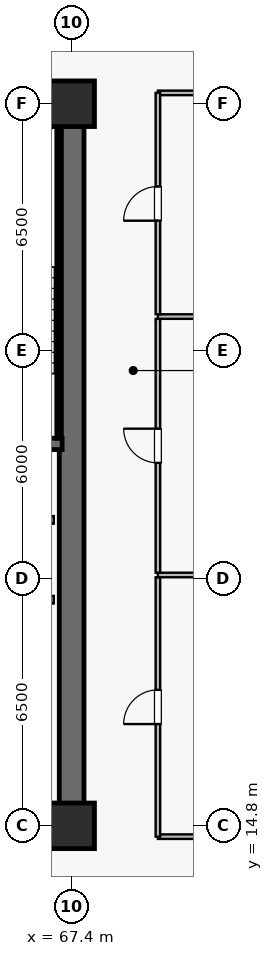
"""IFC4 building model, lengths in metres.
Left out: names, types, materials, properties, quantities, classifications, styles, units other than length and angle.
Written with IfcOpenShell. Run it as: python <this file> out.ifc"""

import sys

from ifc_helpers import new_model, si_unit, direction, frame, frame_2d, origin, origin_2d, place, context, subcontext, project, spatial, rectangle, extrude, source, transform, mapped, element, fill, save


model = new_model("IFC4")
c1 = context("Model", 3, precision=1e-05, world=origin(), true_north=direction((0.0, 1.0)))
c2 = subcontext(c1, "Body", "Model", "MODEL_VIEW")
j1 = project(units=[si_unit("LENGTHUNIT", "METRE"), si_unit("PLANEANGLEUNIT", "RADIAN")], contexts=[c1])
p1 = place(None, origin())
s1 = spatial("IfcSite", under=j1, at=p1, CompositionType="ELEMENT")
p2 = place(p1, origin())
s2 = spatial("IfcBuilding", under=s1, at=p2, CompositionType="ELEMENT")
p3 = place(p2, frame((0.0, 0.0, 150.2)))
s3 = spatial("IfcBuildingStorey", under=s2, at=p3, CompositionType="ELEMENT", Elevation=150.2)
p4 = place(p3, frame((52.275, 14.8, 0.0), z_axis=(0.0, 0.0, 1.0), x_axis=(1.0, 0.0, 0.0)))
e1 = element("IfcWall", 1, at=p4, inside=s3, PredefinedType="SHEAR", context=c2, shape_type="SweptSolid", body=[
    extrude(rectangle(XDim=15.45, YDim=0.65, at=frame_2d((7.725, 0.0))), origin(), (0.0, 0.0, 1.0), 3.79),
])
p5 = place(p3, frame((52.275, 33.8, 0.0), z_axis=(0.0, 0.0, 1.0), x_axis=(1.0, 0.0, 0.0)))
e2 = element("IfcWall", 2, at=p5, inside=s3, PredefinedType="SHEAR", context=c2, shape_type="SweptSolid", body=[
    extrude(rectangle(XDim=15.45, YDim=0.65, at=frame_2d((7.725, 0.0))), origin(), (0.0, 0.0, 1.0), 3.79),
])
p6 = place(p5, frame((8.825, 0.0, 0.0)))
e3 = element("IfcOpeningElement", 3, at=p6, cuts=e2, PredefinedType="OPENING", context=c2, shape_type="SweptSolid", body=[
    extrude(rectangle(XDim=0.95, YDim=2.15, at=frame_2d((0.475, 1.075))), frame((0.0, 0.335, 0.0), z_axis=(0.0, -1.0, 0.0), x_axis=(1.0, 0.0, 0.0)), (0.0, 0.0, 1.0), 0.67),
])
p7 = place(p5, frame((5.46, 0.0, 0.0)))
e4 = element("IfcOpeningElement", 4, at=p7, cuts=e2, PredefinedType="OPENING", context=c2, shape_type="SweptSolid", body=[
    extrude(rectangle(XDim=0.95, YDim=2.15, at=frame_2d((0.475, 1.075))), frame((0.0, 0.335, 0.0), z_axis=(0.0, -1.0, 0.0), x_axis=(1.0, 0.0, 0.0)), (0.0, 0.0, 1.0), 0.67),
])
p8 = place(p5, frame((2.06, 0.0, 0.0)))
e5 = element("IfcOpeningElement", 5, at=p8, cuts=e2, PredefinedType="OPENING", context=c2, shape_type="SweptSolid", body=[
    extrude(rectangle(XDim=0.95, YDim=2.15, at=frame_2d((0.475, 1.075))), frame((0.0, 0.335, 0.0), z_axis=(0.0, -1.0, 0.0), x_axis=(1.0, 0.0, 0.0)), (0.0, 0.0, 1.0), 0.67),
])
p9 = place(p3, frame((67.4, 15.125, 0.0), z_axis=(0.0, 0.0, 1.0), x_axis=(0.0, 1.0, 0.0)))
e6 = element("IfcWall", 6, at=p9, inside=s3, PredefinedType="SHEAR", context=c2, shape_type="SweptSolid", body=[
    extrude(rectangle(XDim=18.35, YDim=0.65, at=frame_2d((9.175, 0.0))), origin(), (0.0, 0.0, 1.0), 3.79),
])
p10 = place(p3, frame((63.35, 24.85, 0.0), z_axis=(0.0, 0.0, 1.0), x_axis=(1.0, 0.0, 0.0)))
e7 = element("IfcWall", 7, at=p10, inside=s3, PredefinedType="SHEAR", context=c2, shape_type="SweptSolid", body=[
    extrude(rectangle(XDim=3.8, YDim=0.3, at=frame_2d((1.9, 0.0))), origin(), (0.0, 0.0, 1.0), 3.79),
])
p11 = place(p3, frame((63.35, 33.4, 0.0), z_axis=(0.0, 0.0, 1.0), x_axis=(1.0, 0.0, 0.0)))
e8 = element("IfcWall", 8, at=p11, inside=s3, PredefinedType="SOLIDWALL", context=c2, shape_type="SweptSolid", body=[
    extrude(rectangle(XDim=3.72, YDim=0.12, at=frame_2d((1.86, 0.0))), origin(), (0.0, 0.0, 1.0), 3.79),
])
p12 = place(p3, frame((67.07, 25.0, 0.0), z_axis=(0.0, 0.0, 1.0), x_axis=(0.0, 1.0, 0.0)))
e9 = element("IfcWall", 9, at=p12, inside=s3, PredefinedType="SOLIDWALL", context=c2, shape_type="SweptSolid", body=[
    extrude(rectangle(XDim=8.32, YDim=0.12, at=frame_2d((4.16, 0.0))), origin(), (0.0, 0.0, 1.0), 3.79),
])
m1 = source(origin(), c2, "Body", "SweptSolid", [
    extrude(rectangle(XDim=1.2, YDim=1.2, at=origin_2d()), origin(), (0.0, 0.0, 1.0), 4.1),
])
for number, where, z_axis, x_axis in (
    (10, (67.4, 14.8, 0.0), (0.0, 0.0, 1.0), (1.0, 0.0, 0.0)),
    (11, (67.4, 33.8, 0.0), (0.0, 0.0, 1.0), (1.0, 0.0, 0.0)),
):
    element("IfcColumn", number, at=place(p3, frame(where, z_axis=z_axis, x_axis=x_axis)), inside=s3, PredefinedType="COLUMN", context=c2, shape_type="MappedRepresentation", body=[
        mapped(m1, transform((0.0, 0.0, 0.0), scale=1.0)),
    ])
for number, where, z_axis, x_axis in (
    (12, (64.67, 20.75, 0.0), (0.0, 0.0, 1.0), (1.0, 0.0, 0.0)),
    (13, (64.67, 22.85, 0.0), (0.0, 0.0, 1.0), (1.0, 0.0, 0.0)),
):
    element("IfcWall", number, at=place(p3, frame(where, z_axis=z_axis, x_axis=x_axis)), inside=s3, PredefinedType="SOLIDWALL", context=c2, shape_type="SweptSolid", body=[
        extrude(rectangle(XDim=2.26, YDim=0.2, at=frame_2d((1.13, 0.0))), origin(), (0.0, 0.0, 1.0), 3.79),
    ])
for number, where, z_axis, x_axis in (
    (14, (69.67, 14.515, 0.0), (0.0, 0.0, 1.0), (1.0, 0.0, 0.0)),
    (15, (69.67, 34.085, 0.0), (0.0, 0.0, 1.0), (1.0, 0.0, 0.0)),
):
    element("IfcWall", number, at=place(p3, frame(where, z_axis=z_axis, x_axis=x_axis)), inside=s3, PredefinedType="PARTITIONING", context=c2, shape_type="SweptSolid", body=[
        extrude(rectangle(XDim=3.02, YDim=0.12, at=frame_2d((1.51, 0.0))), origin(), (0.0, 0.0, 1.0), 3.79),
    ])
p13 = place(p3, frame((69.67, 14.515, 0.0), z_axis=(0.0, 0.0, 1.0), x_axis=(0.0, 1.0, 0.0)))
e16 = element("IfcWall", 16, at=p13, inside=s3, PredefinedType="PARTITIONING", context=c2, shape_type="SweptSolid", body=[
    extrude(rectangle(XDim=6.825, YDim=0.12, at=frame_2d((3.413, 0.0))), origin(), (0.0, 0.0, 1.0), 3.79),
])
p14 = place(p13, frame((2.962, 0.0, 0.0)))
e17 = element("IfcOpeningElement", 17, at=p14, cuts=e16, PredefinedType="OPENING", context=c2, shape_type="SweptSolid", body=[
    extrude(rectangle(XDim=0.9, YDim=2.1, at=frame_2d((0.45, 1.05))), frame((0.0, 0.07, 0.0), z_axis=(0.0, -1.0, 0.0), x_axis=(1.0, 0.0, 0.0)), (0.0, 0.0, 1.0), 0.14),
])
p15 = place(p3, frame((69.67, 21.4, 0.0), z_axis=(0.0, 0.0, 1.0), x_axis=(1.0, 0.0, 0.0)))
e18 = element("IfcWall", 18, at=p15, inside=s3, PredefinedType="PARTITIONING", context=c2, shape_type="SweptSolid", body=[
    extrude(rectangle(XDim=3.02, YDim=0.12, at=frame_2d((1.51, 0.0))), origin(), (0.0, 0.0, 1.0), 3.79),
])
p16 = place(p3, frame((69.67, 21.46, 0.0), z_axis=(0.0, 0.0, 1.0), x_axis=(0.0, 1.0, 0.0)))
e19 = element("IfcWall", 19, at=p16, inside=s3, PredefinedType="PARTITIONING", context=c2, shape_type="SweptSolid", body=[
    extrude(rectangle(XDim=6.68, YDim=0.12, at=frame_2d((3.34, 0.0))), origin(), (0.0, 0.0, 1.0), 3.79),
])
p17 = place(p16, frame((2.89, 0.0, 0.0)))
e20 = element("IfcOpeningElement", 20, at=p17, cuts=e19, PredefinedType="OPENING", context=c2, shape_type="SweptSolid", body=[
    extrude(rectangle(XDim=0.9, YDim=2.1, at=frame_2d((0.45, 1.05))), frame((0.0, 0.07, 0.0), z_axis=(0.0, -1.0, 0.0), x_axis=(1.0, 0.0, 0.0)), (0.0, 0.0, 1.0), 0.14),
])
p18 = place(p3, frame((69.67, 28.2, 0.0), z_axis=(0.0, 0.0, 1.0), x_axis=(1.0, 0.0, 0.0)))
e21 = element("IfcWall", 21, at=p18, inside=s3, PredefinedType="PARTITIONING", context=c2, shape_type="SweptSolid", body=[
    extrude(rectangle(XDim=3.02, YDim=0.12, at=frame_2d((1.51, 0.0))), origin(), (0.0, 0.0, 1.0), 3.79),
])
p19 = place(p3, frame((69.67, 28.26, 0.0), z_axis=(0.0, 0.0, 1.0), x_axis=(0.0, 1.0, 0.0)))
e22 = element("IfcWall", 22, at=p19, inside=s3, PredefinedType="PARTITIONING", context=c2, shape_type="SweptSolid", body=[
    extrude(rectangle(XDim=5.825, YDim=0.12, at=frame_2d((2.913, 0.0))), origin(), (0.0, 0.0, 1.0), 3.79),
])
p20 = place(p19, frame((2.462, 0.0, 0.0)))
e23 = element("IfcOpeningElement", 23, at=p20, cuts=e22, PredefinedType="OPENING", context=c2, shape_type="SweptSolid", body=[
    extrude(rectangle(XDim=0.9, YDim=2.1, at=frame_2d((0.45, 1.05))), frame((0.0, 0.07, 0.0), z_axis=(0.0, -1.0, 0.0), x_axis=(1.0, 0.0, 0.0)), (0.0, 0.0, 1.0), 0.14),
])
m2 = source(origin(), c2, "Body", "SweptSolid", [
    extrude(rectangle(XDim=0.9, YDim=2.1, at=frame_2d((0.45, 1.05))), frame((0.0, 0.025, 0.0), z_axis=(0.0, -1.0, 0.0), x_axis=(1.0, 0.0, 0.0)), (0.0, 0.0, 1.0), 0.05),
])
p21 = place(p14, origin())
e24 = element("IfcDoor", 24, at=p21, inside=s3, OperationType="SINGLE_SWING_LEFT", PredefinedType="DOOR", context=c2, shape_type="MappedRepresentation", body=[
    mapped(m2, transform((0.0, 0.0, 0.0), scale=1.0)),
])
fill(e17, e24)
p22 = place(p17, origin())
e25 = element("IfcDoor", 25, at=p22, inside=s3, OperationType="SINGLE_SWING_RIGHT", PredefinedType="DOOR", context=c2, shape_type="MappedRepresentation", body=[
    mapped(m2, transform((0.0, 0.0, 0.0), scale=1.0)),
])
fill(e20, e25)
p23 = place(p20, origin())
e26 = element("IfcDoor", 26, at=p23, inside=s3, OperationType="SINGLE_SWING_LEFT", PredefinedType="DOOR", context=c2, shape_type="MappedRepresentation", body=[
    mapped(m2, transform((0.0, 0.0, 0.0), scale=1.0)),
])
fill(e23, e26)
save(model, sys.argv[1])
